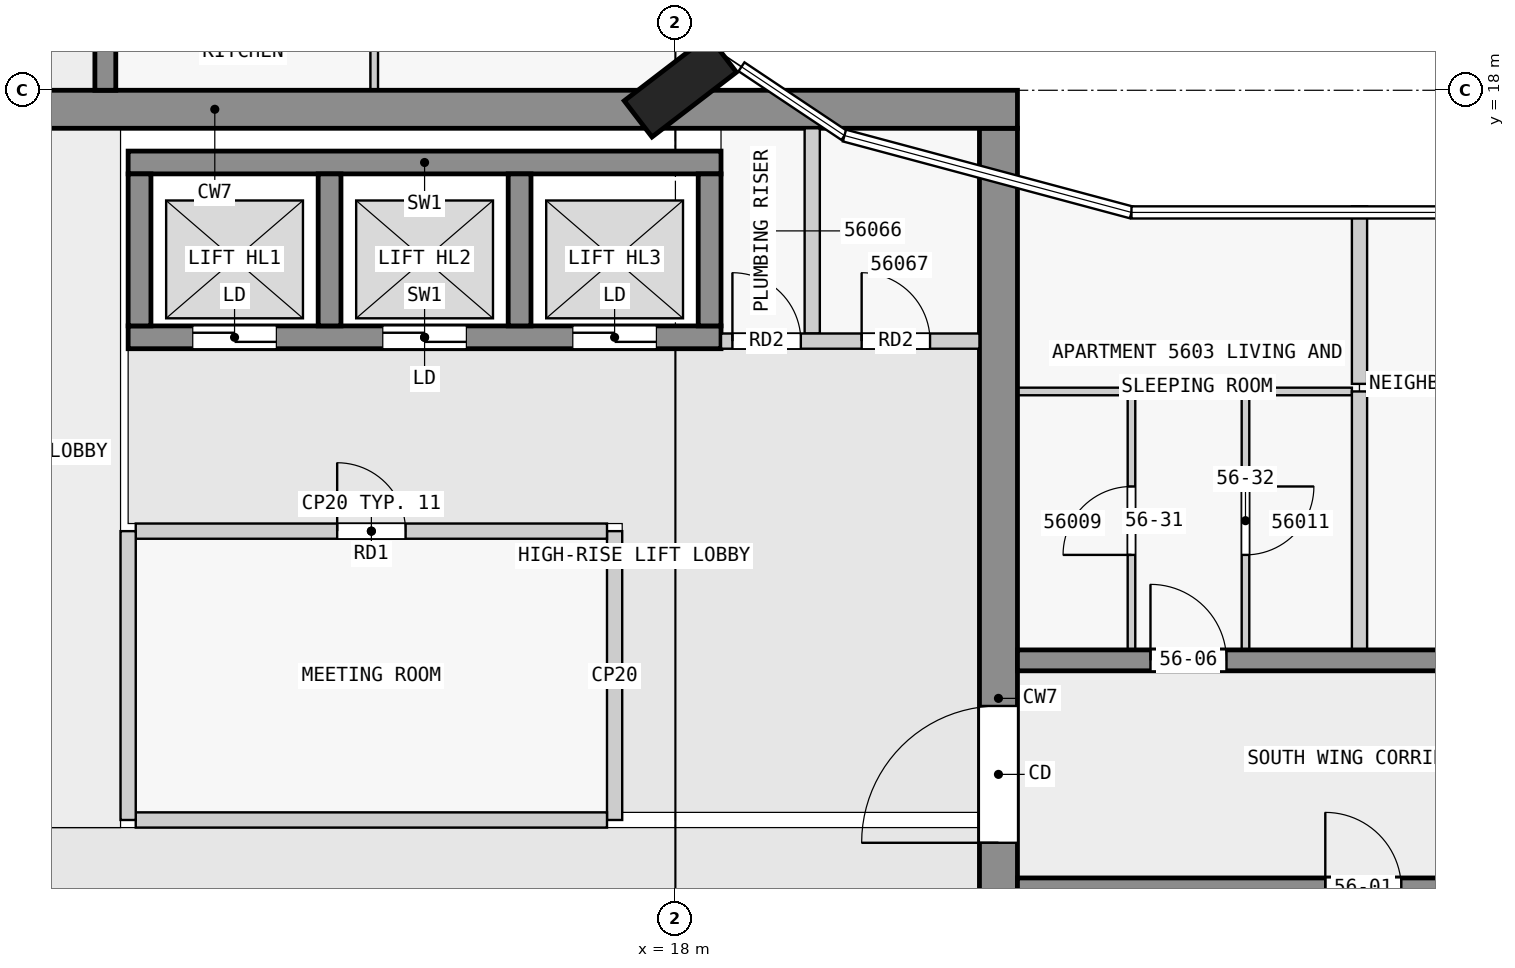
"""IFC4 building model, lengths in metres.
Left out: names, types, materials, properties, quantities, classifications, styles, units other than length and angle.
Written with IfcOpenShell. Run it as: python <this file> out.ifc"""

import sys

from ifc_helpers import new_model, si_unit, direction, frame, frame_2d, origin, origin_2d, place, context, subcontext, project, spatial, rectangle, extrude, element, fill, save


model = new_model("IFC4")
c1 = context("Model", 3, precision=1e-05, world=origin(), true_north=direction((0.0, 1.0)))
c2 = subcontext(c1, "Body", "Model", "MODEL_VIEW")
j1 = project(units=[si_unit("LENGTHUNIT", "METRE"), si_unit("PLANEANGLEUNIT", "RADIAN")], contexts=[c1])
p1 = place(None, origin())
s1 = spatial("IfcSite", under=j1, at=p1, CompositionType="ELEMENT")
p2 = place(p1, origin())
s2 = spatial("IfcBuilding", under=s1, at=p2, CompositionType="ELEMENT")
p3 = place(p2, frame((0.0, 0.0, 215.4)))
s3 = spatial("IfcBuildingStorey", under=s2, at=p3, CompositionType="ELEMENT", Elevation=215.4)
p4 = place(p3, frame((18.065, 18.05, 0.0), z_axis=(0.0, 0.0, 1.0), x_axis=(-0.608810846443, 0.793315418515, 0.0)))
e1 = element("IfcColumn", 1, at=p4, inside=s3, PredefinedType="COLUMN", context=c2, shape_type="SweptSolid", body=[
    extrude(rectangle(XDim=0.6, YDim=1.4, at=origin_2d()), origin(), (0.0, 0.0, 1.0), 3.5),
])
p5 = place(p3, frame((1.38, 17.75, 0.0), z_axis=(0.0, 0.0, 1.0), x_axis=(1.0, 0.0, 0.0)))
e2 = element("IfcWall", 2, at=p5, inside=s3, PredefinedType="SHEAR", context=c2, shape_type="SweptSolid", body=[
    extrude(rectangle(XDim=21.12, YDim=0.5, at=frame_2d((10.56, 0.0))), origin(), (0.0, 0.0, 1.0), 3.25),
])
p6 = place(p5, frame((6.3, 0.0, 0.0)))
e3 = element("IfcOpeningElement", 3, at=p6, cuts=e2, PredefinedType="OPENING", context=c2, shape_type="SweptSolid", body=[
    extrude(rectangle(XDim=1.8, YDim=2.1, at=frame_2d((0.9, 1.05))), frame((0.0, 0.26, 0.0), z_axis=(0.0, -1.0, 0.0), x_axis=(1.0, 0.0, 0.0)), (0.0, 0.0, 1.0), 0.52),
])
p7 = place(p3, frame((22.25, 2.5, 0.0), z_axis=(0.0, 0.0, 1.0), x_axis=(0.0, 1.0, 0.0)))
e4 = element("IfcWall", 4, at=p7, inside=s3, PredefinedType="SHEAR", context=c2, shape_type="SweptSolid", body=[
    extrude(rectangle(XDim=15.0, YDim=0.5, at=frame_2d((7.5, 0.0))), origin(), (0.0, 0.0, 1.0), 3.25),
])
p8 = place(p7, frame((5.6, 0.0, 0.0)))
e5 = element("IfcOpeningElement", 5, at=p8, cuts=e4, PredefinedType="OPENING", context=c2, shape_type="SweptSolid", body=[
    extrude(rectangle(XDim=1.8, YDim=2.1, at=frame_2d((0.9, 1.05))), frame((0.0, 0.26, 0.0), z_axis=(0.0, -1.0, 0.0), x_axis=(1.0, 0.0, 0.0)), (0.0, 0.0, 1.0), 0.52),
])
p9 = place(p3, frame((10.8, 17.05, 0.0), z_axis=(0.0, 0.0, 1.0), x_axis=(1.0, 0.0, 0.0)))
e6 = element("IfcWall", 6, at=p9, inside=s3, PredefinedType="SHEAR", context=c2, shape_type="SweptSolid", body=[
    extrude(rectangle(XDim=7.8, YDim=0.3, at=frame_2d((3.9, 0.0))), origin(), (0.0, 0.0, 1.0), 3.25),
])
p10 = place(p3, frame((10.8, 14.75, 0.0), z_axis=(0.0, 0.0, 1.0), x_axis=(1.0, 0.0, 0.0)))
e7 = element("IfcWall", 7, at=p10, inside=s3, PredefinedType="SHEAR", context=c2, shape_type="SweptSolid", body=[
    extrude(rectangle(XDim=7.8, YDim=0.3, at=frame_2d((3.9, 0.0))), origin(), (0.0, 0.0, 1.0), 3.25),
])
p11 = place(p10, frame((0.85, 0.0, 0.0)))
e8 = element("IfcOpeningElement", 8, at=p11, cuts=e7, PredefinedType="OPENING", context=c2, shape_type="SweptSolid", body=[
    extrude(rectangle(XDim=1.1, YDim=2.1, at=frame_2d((0.55, 1.05))), frame((0.0, 0.16, 0.0), z_axis=(0.0, -1.0, 0.0), x_axis=(1.0, 0.0, 0.0)), (0.0, 0.0, 1.0), 0.32),
])
p12 = place(p10, frame((3.35, 0.0, 0.0)))
e9 = element("IfcOpeningElement", 9, at=p12, cuts=e7, PredefinedType="OPENING", context=c2, shape_type="SweptSolid", body=[
    extrude(rectangle(XDim=1.1, YDim=2.1, at=frame_2d((0.55, 1.05))), frame((0.0, 0.16, 0.0), z_axis=(0.0, -1.0, 0.0), x_axis=(1.0, 0.0, 0.0)), (0.0, 0.0, 1.0), 0.32),
])
p13 = place(p10, frame((5.85, 0.0, 0.0)))
e10 = element("IfcOpeningElement", 10, at=p13, cuts=e7, PredefinedType="OPENING", context=c2, shape_type="SweptSolid", body=[
    extrude(rectangle(XDim=1.1, YDim=2.1, at=frame_2d((0.55, 1.05))), frame((0.0, 0.16, 0.0), z_axis=(0.0, -1.0, 0.0), x_axis=(1.0, 0.0, 0.0)), (0.0, 0.0, 1.0), 0.32),
])
for number, where, z_axis, x_axis in (
    (11, (10.95, 14.9, 0.0), (0.0, 0.0, 1.0), (0.0, 1.0, 0.0)),
    (12, (13.45, 14.9, 0.0), (0.0, 0.0, 1.0), (0.0, 1.0, 0.0)),
    (13, (15.95, 14.9, 0.0), (0.0, 0.0, 1.0), (0.0, 1.0, 0.0)),
    (14, (18.45, 14.9, 0.0), (0.0, 0.0, 1.0), (0.0, 1.0, 0.0)),
):
    element("IfcWall", number, at=place(p3, frame(where, z_axis=z_axis, x_axis=x_axis)), inside=s3, PredefinedType="SHEAR", context=c2, shape_type="SweptSolid", body=[
        extrude(rectangle(XDim=2.0, YDim=0.3, at=frame_2d((1.0, 0.0))), origin(), (0.0, 0.0, 1.0), 3.25),
    ])
p14 = place(p3, frame((22.5, 7.5, 0.0), z_axis=(0.0, 0.0, 1.0), x_axis=(1.0, 0.0, 0.0)))
e15 = element("IfcWall", 15, at=p14, inside=s3, PredefinedType="SHEAR", context=c2, shape_type="SweptSolid", body=[
    extrude(rectangle(XDim=22.5, YDim=0.275, at=frame_2d((11.25, 0.0))), origin(), (0.0, 0.0, 1.0), 3.25),
])
p15 = place(p14, frame((4.05, 0.0, 0.0)))
e16 = element("IfcOpeningElement", 16, at=p15, cuts=e15, PredefinedType="OPENING", context=c2, shape_type="SweptSolid", body=[
    extrude(rectangle(XDim=1.0, YDim=2.1, at=frame_2d((0.5, 1.05))), frame((0.0, 0.147, 0.0), z_axis=(0.0, -1.0, 0.0), x_axis=(1.0, 0.0, 0.0)), (0.0, 0.0, 1.0), 0.295),
])
p16 = place(p14, frame((10.75, 0.0, 0.0)))
e17 = element("IfcOpeningElement", 17, at=p16, cuts=e15, PredefinedType="OPENING", context=c2, shape_type="SweptSolid", body=[
    extrude(rectangle(XDim=1.0, YDim=2.1, at=frame_2d((0.5, 1.05))), frame((0.0, 0.147, 0.0), z_axis=(0.0, -1.0, 0.0), x_axis=(1.0, 0.0, 0.0)), (0.0, 0.0, 1.0), 0.295),
])
p17 = place(p14, frame((15.25, 0.0, 0.0)))
e18 = element("IfcOpeningElement", 18, at=p17, cuts=e15, PredefinedType="OPENING", context=c2, shape_type="SweptSolid", body=[
    extrude(rectangle(XDim=1.0, YDim=2.1, at=frame_2d((0.5, 1.05))), frame((0.0, 0.147, 0.0), z_axis=(0.0, -1.0, 0.0), x_axis=(1.0, 0.0, 0.0)), (0.0, 0.0, 1.0), 0.295),
])
p18 = place(p14, frame((18.75, 0.0, 0.0)))
e19 = element("IfcOpeningElement", 19, at=p18, cuts=e15, PredefinedType="OPENING", context=c2, shape_type="SweptSolid", body=[
    extrude(rectangle(XDim=0.9, YDim=2.1, at=frame_2d((0.45, 1.05))), frame((0.0, 0.147, 0.0), z_axis=(0.0, -1.0, 0.0), x_axis=(1.0, 0.0, 0.0)), (0.0, 0.0, 1.0), 0.295),
])
p19 = place(p14, frame((20.95, 0.0, 0.0)))
e20 = element("IfcOpeningElement", 20, at=p19, cuts=e15, PredefinedType="OPENING", context=c2, shape_type="SweptSolid", body=[
    extrude(rectangle(XDim=1.0, YDim=2.1, at=frame_2d((0.5, 1.05))), frame((0.0, 0.147, 0.0), z_axis=(0.0, -1.0, 0.0), x_axis=(1.0, 0.0, 0.0)), (0.0, 0.0, 1.0), 0.295),
])
p20 = place(p3, frame((22.5, 10.5, 0.0), z_axis=(0.0, 0.0, 1.0), x_axis=(1.0, 0.0, 0.0)))
e21 = element("IfcWall", 21, at=p20, inside=s3, PredefinedType="SHEAR", context=c2, shape_type="SweptSolid", body=[
    extrude(rectangle(XDim=22.5, YDim=0.275, at=frame_2d((11.25, 0.0))), origin(), (0.0, 0.0, 1.0), 3.25),
])
p21 = place(p20, frame((1.75, 0.0, 0.0)))
e22 = element("IfcOpeningElement", 22, at=p21, cuts=e21, PredefinedType="OPENING", context=c2, shape_type="SweptSolid", body=[
    extrude(rectangle(XDim=1.0, YDim=2.1, at=frame_2d((0.5, 1.05))), frame((0.0, 0.147, 0.0), z_axis=(0.0, -1.0, 0.0), x_axis=(1.0, 0.0, 0.0)), (0.0, 0.0, 1.0), 0.295),
])
p22 = place(p20, frame((5.85, 0.0, 0.0)))
e23 = element("IfcOpeningElement", 23, at=p22, cuts=e21, PredefinedType="OPENING", context=c2, shape_type="SweptSolid", body=[
    extrude(rectangle(XDim=1.8, YDim=2.1, at=frame_2d((0.9, 1.05))), frame((0.0, 0.147, 0.0), z_axis=(0.0, -1.0, 0.0), x_axis=(1.0, 0.0, 0.0)), (0.0, 0.0, 1.0), 0.295),
])
p23 = place(p20, frame((10.75, 0.0, 0.0)))
e24 = element("IfcOpeningElement", 24, at=p23, cuts=e21, PredefinedType="OPENING", context=c2, shape_type="SweptSolid", body=[
    extrude(rectangle(XDim=1.0, YDim=2.1, at=frame_2d((0.5, 1.05))), frame((0.0, 0.147, 0.0), z_axis=(0.0, -1.0, 0.0), x_axis=(1.0, 0.0, 0.0)), (0.0, 0.0, 1.0), 0.295),
])
p24 = place(p20, frame((16.85, 0.0, 0.0)))
e25 = element("IfcOpeningElement", 25, at=p24, cuts=e21, PredefinedType="OPENING", context=c2, shape_type="SweptSolid", body=[
    extrude(rectangle(XDim=1.0, YDim=2.1, at=frame_2d((0.5, 1.05))), frame((0.0, 0.147, 0.0), z_axis=(0.0, -1.0, 0.0), x_axis=(1.0, 0.0, 0.0)), (0.0, 0.0, 1.0), 0.295),
])
p25 = place(p3, frame((10.5, 18.0, 0.0), z_axis=(0.0, 0.0, 1.0), x_axis=(0.0, 1.0, 0.0)))
e26 = element("IfcWall", 26, at=p25, inside=s3, PredefinedType="SHEAR", context=c2, shape_type="SweptSolid", body=[
    extrude(rectangle(XDim=27.0, YDim=0.275, at=frame_2d((13.5, 0.0))), origin(), (0.0, 0.0, 1.0), 3.25),
])
p26 = place(p25, frame((1.75, 0.0, 0.0)))
e27 = element("IfcOpeningElement", 27, at=p26, cuts=e26, PredefinedType="OPENING", context=c2, shape_type="SweptSolid", body=[
    extrude(rectangle(XDim=1.0, YDim=2.1, at=frame_2d((0.5, 1.05))), frame((0.0, 0.147, 0.0), z_axis=(0.0, -1.0, 0.0), x_axis=(1.0, 0.0, 0.0)), (0.0, 0.0, 1.0), 0.295),
])
p27 = place(p25, frame((6.25, 0.0, 0.0)))
e28 = element("IfcOpeningElement", 28, at=p27, cuts=e26, PredefinedType="OPENING", context=c2, shape_type="SweptSolid", body=[
    extrude(rectangle(XDim=1.0, YDim=2.1, at=frame_2d((0.5, 1.05))), frame((0.0, 0.147, 0.0), z_axis=(0.0, -1.0, 0.0), x_axis=(1.0, 0.0, 0.0)), (0.0, 0.0, 1.0), 0.295),
])
p28 = place(p25, frame((10.75, 0.0, 0.0)))
e29 = element("IfcOpeningElement", 29, at=p28, cuts=e26, PredefinedType="OPENING", context=c2, shape_type="SweptSolid", body=[
    extrude(rectangle(XDim=1.0, YDim=2.1, at=frame_2d((0.5, 1.05))), frame((0.0, 0.147, 0.0), z_axis=(0.0, -1.0, 0.0), x_axis=(1.0, 0.0, 0.0)), (0.0, 0.0, 1.0), 0.295),
])
p29 = place(p25, frame((15.25, 0.0, 0.0)))
e30 = element("IfcOpeningElement", 30, at=p29, cuts=e26, PredefinedType="OPENING", context=c2, shape_type="SweptSolid", body=[
    extrude(rectangle(XDim=1.0, YDim=2.1, at=frame_2d((0.5, 1.05))), frame((0.0, 0.147, 0.0), z_axis=(0.0, -1.0, 0.0), x_axis=(1.0, 0.0, 0.0)), (0.0, 0.0, 1.0), 0.295),
])
p30 = place(p25, frame((21.35, 0.0, 0.0)))
e31 = element("IfcOpeningElement", 31, at=p30, cuts=e26, PredefinedType="OPENING", context=c2, shape_type="SweptSolid", body=[
    extrude(rectangle(XDim=1.0, YDim=2.1, at=frame_2d((0.5, 1.05))), frame((0.0, 0.147, 0.0), z_axis=(0.0, -1.0, 0.0), x_axis=(1.0, 0.0, 0.0)), (0.0, 0.0, 1.0), 0.295),
])
p31 = place(p3, frame((10.8, 8.4, 0.0), z_axis=(0.0, 0.0, 1.0), x_axis=(0.0, 1.0, 0.0)))
e32 = element("IfcWall", 32, at=p31, inside=s3, PredefinedType="PARTITIONING", context=c2, shape_type="SweptSolid", body=[
    extrude(rectangle(XDim=3.8, YDim=0.2, at=frame_2d((1.9, 0.0))), origin(), (0.0, 0.0, 1.0), 3.25),
])
p32 = place(p3, frame((10.9, 8.4, 0.0), z_axis=(0.0, 0.0, 1.0), x_axis=(1.0, 0.0, 0.0)))
e33 = element("IfcWall", 33, at=p32, inside=s3, PredefinedType="PARTITIONING", context=c2, shape_type="SweptSolid", body=[
    extrude(rectangle(XDim=6.2, YDim=0.2, at=frame_2d((3.1, 0.0))), origin(), (0.0, 0.0, 1.0), 3.25),
])
p33 = place(p3, frame((17.2, 8.4, 0.0), z_axis=(0.0, 0.0, 1.0), x_axis=(0.0, 1.0, 0.0)))
e34 = element("IfcWall", 34, at=p33, inside=s3, PredefinedType="PARTITIONING", context=c2, shape_type="SweptSolid", body=[
    extrude(rectangle(XDim=3.8, YDim=0.2, at=frame_2d((1.9, 0.0))), origin(), (0.0, 0.0, 1.0), 3.25),
])
p34 = place(p3, frame((10.9, 12.2, 0.0), z_axis=(0.0, 0.0, 1.0), x_axis=(1.0, 0.0, 0.0)))
e35 = element("IfcWall", 35, at=p34, inside=s3, PredefinedType="PARTITIONING", context=c2, shape_type="SweptSolid", body=[
    extrude(rectangle(XDim=6.2, YDim=0.2, at=frame_2d((3.1, 0.0))), origin(), (0.0, 0.0, 1.0), 3.25),
])
p35 = place(p34, frame((2.65, 0.0, 0.0)))
e36 = element("IfcOpeningElement", 36, at=p35, cuts=e35, PredefinedType="OPENING", context=c2, shape_type="SweptSolid", body=[
    extrude(rectangle(XDim=0.9, YDim=2.1, at=frame_2d((0.45, 1.05))), frame((0.0, 0.11, 0.0), z_axis=(0.0, -1.0, 0.0), x_axis=(1.0, 0.0, 0.0)), (0.0, 0.0, 1.0), 0.22),
])
p36 = place(p3, frame((18.6, 14.7, 0.0), z_axis=(0.0, 0.0, 1.0), x_axis=(1.0, 0.0, 0.0)))
e37 = element("IfcWall", 37, at=p36, inside=s3, PredefinedType="PARTITIONING", context=c2, shape_type="SweptSolid", body=[
    extrude(rectangle(XDim=3.4, YDim=0.2, at=frame_2d((1.7, 0.0))), origin(), (0.0, 0.0, 1.0), 3.25),
])
p37 = place(p36, frame((0.15, 0.0, 0.0)))
e38 = element("IfcOpeningElement", 38, at=p37, cuts=e37, PredefinedType="OPENING", context=c2, shape_type="SweptSolid", body=[
    extrude(rectangle(XDim=0.9, YDim=2.1, at=frame_2d((0.45, 1.05))), frame((0.0, 0.11, 0.0), z_axis=(0.0, -1.0, 0.0), x_axis=(1.0, 0.0, 0.0)), (0.0, 0.0, 1.0), 0.22),
])
p38 = place(p36, frame((1.85, 0.0, 0.0)))
e39 = element("IfcOpeningElement", 39, at=p38, cuts=e37, PredefinedType="OPENING", context=c2, shape_type="SweptSolid", body=[
    extrude(rectangle(XDim=0.9, YDim=2.1, at=frame_2d((0.45, 1.05))), frame((0.0, 0.11, 0.0), z_axis=(0.0, -1.0, 0.0), x_axis=(1.0, 0.0, 0.0)), (0.0, 0.0, 1.0), 0.22),
])
p39 = place(p3, frame((19.8, 14.8, 0.0), z_axis=(0.0, 0.0, 1.0), x_axis=(0.0, 1.0, 0.0)))
e40 = element("IfcWall", 40, at=p39, inside=s3, PredefinedType="PARTITIONING", context=c2, shape_type="SweptSolid", body=[
    extrude(rectangle(XDim=2.7, YDim=0.2, at=frame_2d((1.35, 0.0))), origin(), (0.0, 0.0, 1.0), 3.25),
])
p40 = place(p3, frame((23.95, 14.038, 0.0), z_axis=(0.0, 0.0, 1.0), x_axis=(-1.0, 0.0, 0.0)))
e41 = element("IfcWall", 41, at=p40, inside=s3, PredefinedType="PARTITIONING", context=c2, shape_type="SweptSolid", body=[
    extrude(rectangle(XDim=1.45, YDim=0.1, at=frame_2d((0.725, 0.0))), origin(), (0.0, 0.0, 1.0), 3.25),
])
p41 = place(p3, frame((26.9, 14.038, 0.0), z_axis=(0.0, 0.0, 1.0), x_axis=(-1.0, 0.0, 0.0)))
e42 = element("IfcWall", 42, at=p41, inside=s3, PredefinedType="PARTITIONING", context=c2, shape_type="SweptSolid", body=[
    extrude(rectangle(XDim=1.35, YDim=0.1, at=frame_2d((0.675, 0.0))), origin(), (0.0, 0.0, 1.0), 3.25),
])
p42 = place(p3, frame((14.038, 18.0, 0.0), z_axis=(0.0, 0.0, 1.0), x_axis=(0.0, 1.0, 0.0)))
e43 = element("IfcWall", 43, at=p42, inside=s3, PredefinedType="PARTITIONING", context=c2, shape_type="SweptSolid", body=[
    extrude(rectangle(XDim=1.45, YDim=0.1, at=frame_2d((0.725, 0.0))), origin(), (0.0, 0.0, 1.0), 3.25),
])
p43 = place(p3, frame((24.0, 10.637, 0.0), z_axis=(0.0, 0.0, 1.0), x_axis=(0.0, 1.0, 0.0)))
e44 = element("IfcWall", 44, at=p43, inside=s3, PredefinedType="PARTITIONING", context=c2, shape_type="SweptSolid", body=[
    extrude(rectangle(XDim=3.4, YDim=0.1, at=frame_2d((1.7, 0.0))), origin(), (0.0, 0.0, 1.0), 3.25),
])
p44 = place(p43, frame((1.25, 0.0, 0.0)))
e45 = element("IfcOpeningElement", 45, at=p44, cuts=e44, PredefinedType="OPENING", context=c2, shape_type="SweptSolid", body=[
    extrude(rectangle(XDim=0.9, YDim=2.1, at=frame_2d((0.45, 1.05))), frame((0.0, 0.06, 0.0), z_axis=(0.0, -1.0, 0.0), x_axis=(1.0, 0.0, 0.0)), (0.0, 0.0, 1.0), 0.12),
])
p45 = place(p3, frame((25.5, 14.038, 0.0), z_axis=(0.0, 0.0, 1.0), x_axis=(0.0, -1.0, 0.0)))
e46 = element("IfcWall", 46, at=p45, inside=s3, PredefinedType="PARTITIONING", context=c2, shape_type="SweptSolid", body=[
    extrude(rectangle(XDim=3.4, YDim=0.1, at=frame_2d((1.7, 0.0))), origin(), (0.0, 0.0, 1.0), 3.25),
])
p46 = place(p45, frame((1.25, 0.0, 0.0)))
e47 = element("IfcOpeningElement", 47, at=p46, cuts=e46, PredefinedType="OPENING", context=c2, shape_type="SweptSolid", body=[
    extrude(rectangle(XDim=0.9, YDim=2.1, at=frame_2d((0.45, 1.05))), frame((0.0, 0.06, 0.0), z_axis=(0.0, -1.0, 0.0), x_axis=(1.0, 0.0, 0.0)), (0.0, 0.0, 1.0), 0.12),
])
p47 = place(p3, frame((27.0, 16.473, 0.0), z_axis=(0.0, 0.0, 1.0), x_axis=(0.0, -1.0, 0.0)))
e48 = element("IfcWall", 48, at=p47, inside=s3, PredefinedType="PARTITIONING", context=c2, shape_type="SweptSolid", body=[
    extrude(rectangle(XDim=2.336, YDim=0.2, at=frame_2d((1.168, 0.0))), origin(), (0.0, 0.0, 1.0), 3.25),
])
p48 = place(p3, frame((27.0, 10.637, 0.0), z_axis=(0.0, 0.0, 1.0), x_axis=(0.0, 1.0, 0.0)))
e49 = element("IfcWall", 49, at=p48, inside=s3, PredefinedType="PARTITIONING", context=c2, shape_type="SweptSolid", body=[
    extrude(rectangle(XDim=3.4, YDim=0.2, at=frame_2d((1.7, 0.0))), origin(), (0.0, 0.0, 1.0), 3.25),
])
p49 = place(p35, origin())
e50 = element("IfcDoor", 50, at=p49, inside=s3, OperationType="SINGLE_SWING_LEFT", PredefinedType="DOOR", context=c2, shape_type="SweptSolid", body=[
    extrude(rectangle(XDim=0.9, YDim=2.1, at=frame_2d((0.45, 1.05))), frame((0.0, 0.025, 0.0), z_axis=(0.0, -1.0, 0.0), x_axis=(1.0, 0.0, 0.0)), (0.0, 0.0, 1.0), 0.05),
])
fill(e36, e50)
p50 = place(p11, origin())
e51 = element("IfcDoor", 51, at=p50, inside=s3, OperationType="DOUBLE_DOOR_SLIDING", PredefinedType="DOOR", context=c2, shape_type="SweptSolid", body=[
    extrude(rectangle(XDim=1.1, YDim=2.1, at=frame_2d((0.55, 1.05))), frame((0.0, 0.025, 0.0), z_axis=(0.0, -1.0, 0.0), x_axis=(1.0, 0.0, 0.0)), (0.0, 0.0, 1.0), 0.05),
])
fill(e8, e51)
p51 = place(p12, origin())
e52 = element("IfcDoor", 52, at=p51, inside=s3, OperationType="DOUBLE_DOOR_SLIDING", PredefinedType="DOOR", context=c2, shape_type="SweptSolid", body=[
    extrude(rectangle(XDim=1.1, YDim=2.1, at=frame_2d((0.55, 1.05))), frame((0.0, 0.025, 0.0), z_axis=(0.0, -1.0, 0.0), x_axis=(1.0, 0.0, 0.0)), (0.0, 0.0, 1.0), 0.05),
])
fill(e9, e52)
p52 = place(p13, origin())
e53 = element("IfcDoor", 53, at=p52, inside=s3, OperationType="DOUBLE_DOOR_SLIDING", PredefinedType="DOOR", context=c2, shape_type="SweptSolid", body=[
    extrude(rectangle(XDim=1.1, YDim=2.1, at=frame_2d((0.55, 1.05))), frame((0.0, 0.025, 0.0), z_axis=(0.0, -1.0, 0.0), x_axis=(1.0, 0.0, 0.0)), (0.0, 0.0, 1.0), 0.05),
])
fill(e10, e53)
p53 = place(p8, origin())
e54 = element("IfcDoor", 54, at=p53, inside=s3, OperationType="DOUBLE_DOOR_SINGLE_SWING", PredefinedType="DOOR", context=c2, shape_type="SweptSolid", body=[
    extrude(rectangle(XDim=1.8, YDim=2.1, at=frame_2d((0.9, 1.05))), frame((0.0, 0.025, 0.0), z_axis=(0.0, -1.0, 0.0), x_axis=(1.0, 0.0, 0.0)), (0.0, 0.0, 1.0), 0.05),
])
fill(e5, e54)
p54 = place(p37, origin())
e55 = element("IfcDoor", 55, at=p54, inside=s3, OperationType="SINGLE_SWING_LEFT", PredefinedType="DOOR", context=c2, shape_type="SweptSolid", body=[
    extrude(rectangle(XDim=0.9, YDim=2.1, at=frame_2d((0.45, 1.05))), frame((0.0, 0.025, 0.0), z_axis=(0.0, -1.0, 0.0), x_axis=(1.0, 0.0, 0.0)), (0.0, 0.0, 1.0), 0.05),
])
fill(e38, e55)
p55 = place(p38, origin())
e56 = element("IfcDoor", 56, at=p55, inside=s3, OperationType="SINGLE_SWING_LEFT", PredefinedType="DOOR", context=c2, shape_type="SweptSolid", body=[
    extrude(rectangle(XDim=0.9, YDim=2.1, at=frame_2d((0.45, 1.05))), frame((0.0, 0.025, 0.0), z_axis=(0.0, -1.0, 0.0), x_axis=(1.0, 0.0, 0.0)), (0.0, 0.0, 1.0), 0.05),
])
fill(e39, e56)
p56 = place(p15, origin())
e57 = element("IfcDoor", 57, at=p56, inside=s3, OperationType="SINGLE_SWING_LEFT", PredefinedType="DOOR", context=c2, shape_type="SweptSolid", body=[
    extrude(rectangle(XDim=1.0, YDim=2.1, at=frame_2d((0.5, 1.05))), frame((0.0, 0.025, 0.0), z_axis=(0.0, -1.0, 0.0), x_axis=(1.0, 0.0, 0.0)), (0.0, 0.0, 1.0), 0.05),
])
fill(e16, e57)
p57 = place(p21, origin())
e58 = element("IfcDoor", 58, at=p57, inside=s3, OperationType="SINGLE_SWING_LEFT", PredefinedType="DOOR", context=c2, shape_type="SweptSolid", body=[
    extrude(rectangle(XDim=1.0, YDim=2.1, at=frame_2d((0.5, 1.05))), frame((0.0, 0.025, 0.0), z_axis=(0.0, -1.0, 0.0), x_axis=(1.0, 0.0, 0.0)), (0.0, 0.0, 1.0), 0.05),
])
fill(e22, e58)
p58 = place(p44, origin())
e59 = element("IfcDoor", 59, at=p58, inside=s3, OperationType="SINGLE_SWING_LEFT", PredefinedType="DOOR", context=c2, shape_type="SweptSolid", body=[
    extrude(rectangle(XDim=0.9, YDim=2.1, at=frame_2d((0.45, 1.05))), frame((0.0, 0.025, 0.0), z_axis=(0.0, -1.0, 0.0), x_axis=(1.0, 0.0, 0.0)), (0.0, 0.0, 1.0), 0.05),
])
fill(e45, e59)
p59 = place(p46, origin())
e60 = element("IfcDoor", 60, at=p59, inside=s3, OperationType="SINGLE_SWING_LEFT", PredefinedType="DOOR", context=c2, shape_type="SweptSolid", body=[
    extrude(rectangle(XDim=0.9, YDim=2.1, at=frame_2d((0.45, 1.05))), frame((0.0, 0.025, 0.0), z_axis=(0.0, -1.0, 0.0), x_axis=(1.0, 0.0, 0.0)), (0.0, 0.0, 1.0), 0.05),
])
fill(e47, e60)
save(model, sys.argv[1])
